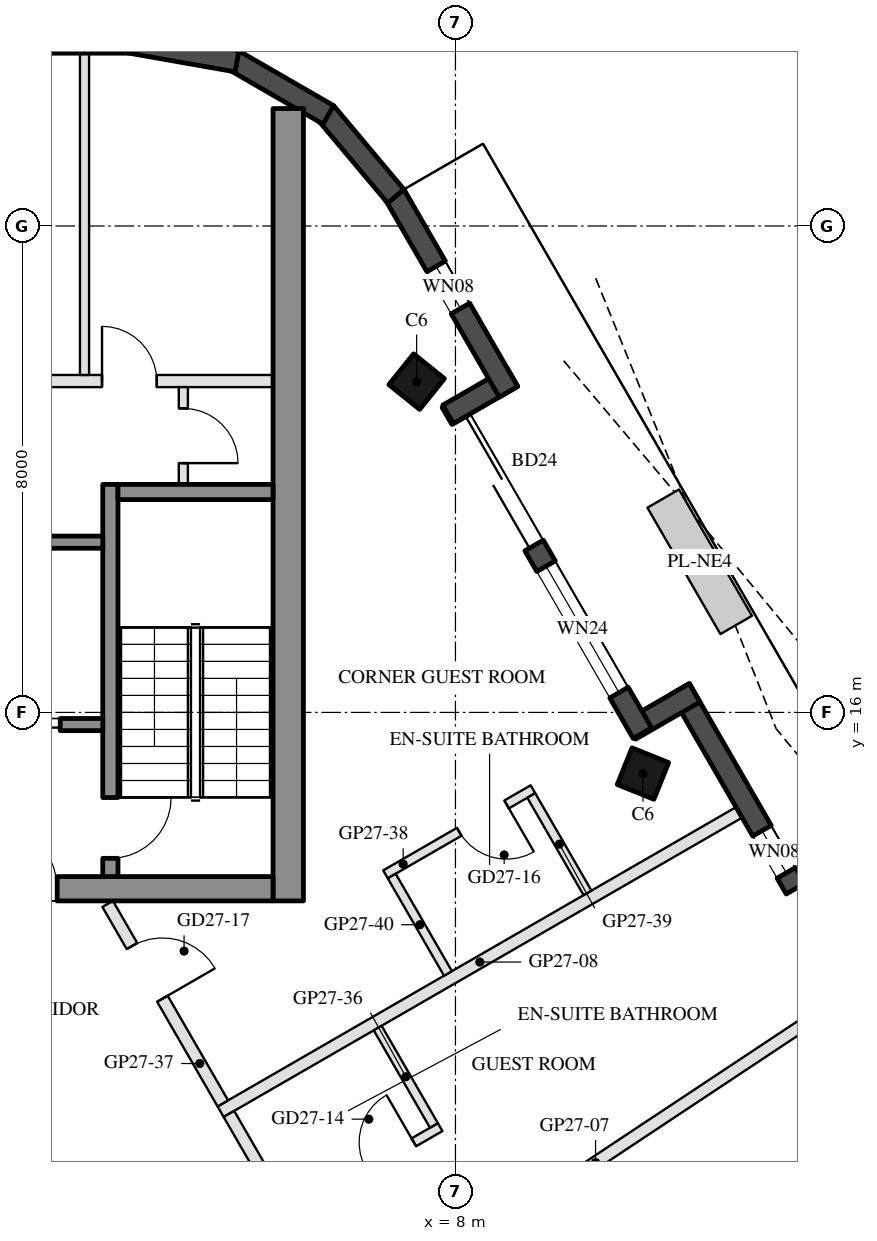
"""IFC4 building model, lengths in metres.
Left out: names, types, materials, properties, quantities, classifications, styles, units other than length and angle.
Written with IfcOpenShell. Run it as: python <this file> out.ifc"""

import sys

from ifc_helpers import new_model, si_unit, direction, frame, frame_2d, origin, origin_2d, place, context, subcontext, project, spatial, rectangle, hollow_rectangle, extrude, boolean, halfspace, element, fill, save


model = new_model("IFC4")
c1 = context("Model", 3, precision=1e-05, world=origin(), true_north=direction((0.0, 1.0)))
c2 = subcontext(c1, "Body", "Model", "MODEL_VIEW")
j1 = project(units=[si_unit("LENGTHUNIT", "METRE"), si_unit("PLANEANGLEUNIT", "RADIAN")], contexts=[c1])
p1 = place(None, origin())
s1 = spatial("IfcSite", under=j1, at=p1, CompositionType="ELEMENT")
p2 = place(p1, origin())
s2 = spatial("IfcBuilding", under=s1, at=p2, CompositionType="ELEMENT")
p3 = place(p2, frame((0.0, 0.0, 276.3)))
s3 = spatial("IfcBuildingStorey", under=s2, at=p3, CompositionType="ELEMENT", Elevation=276.3)
p4 = place(p3, frame((11.083, 14.994, 0.0), z_axis=(-0.100518021011, -0.128316722417, 0.98662604172), x_axis=(-0.503129383785, 0.862065632243, 0.060857775822)))
e1 = element("IfcColumn", 1, at=p4, inside=s3, PredefinedType="COLUMN", context=c2, shape_type="SweptSolid", body=[
    boolean("DIFFERENCE", boolean("DIFFERENCE", extrude(hollow_rectangle(XDim=0.65, YDim=0.65, WallThickness=0.03, at=origin_2d()), origin(), (0.0, 0.0, 1.0), 3.75), halfspace(frame((0.0, 0.0, 0.04), z_axis=(0.0, 0.0, 1.0), x_axis=(1.0, 0.0, 0.0)), True)), halfspace(frame((0.0, 0.0, 3.71), z_axis=(0.0, 0.0, 1.0), x_axis=(1.0, 0.0, 0.0)), False)),
])
p5 = place(p3, frame((7.362, 21.44, 0.0), z_axis=(-0.06966478086, -0.179988931962, 0.981198656073), x_axis=(-0.504437272402, 0.854926536661, 0.121010971086)))
e2 = element("IfcColumn", 2, at=p5, inside=s3, PredefinedType="COLUMN", context=c2, shape_type="SweptSolid", body=[
    boolean("DIFFERENCE", boolean("DIFFERENCE", extrude(hollow_rectangle(XDim=0.65, YDim=0.65, WallThickness=0.03, at=origin_2d()), origin(), (0.0, 0.0, 1.0), 3.771), halfspace(frame((0.0, 0.0, 0.047), z_axis=(0.0, 0.0, 1.0), x_axis=(1.0, 0.0, 0.0)), True)), halfspace(frame((0.0, 0.0, 3.724), z_axis=(0.0, 0.0, 1.0), x_axis=(1.0, 0.0, 0.0)), False)),
])
p6 = place(p3, frame((16.316, 8.381, 0.0), z_axis=(0.0, 0.0, 1.0), x_axis=(-0.500005190411, 0.866022407078, 0.0)))
e3 = element("IfcWall", 3, at=p6, inside=s3, PredefinedType="SOLIDWALL", context=c2, shape_type="SweptSolid", body=[
    extrude(rectangle(XDim=9.244, YDim=0.35, at=frame_2d((4.622, 0.0))), origin(), (0.0, 0.0, 1.0), 3.55),
])
p7 = place(p6, frame((1.614, 0.0, 0.0)))
e4 = element("IfcOpeningElement", 4, at=p7, cuts=e3, PredefinedType="OPENING", context=c2, shape_type="SweptSolid", body=[
    extrude(rectangle(XDim=1.4, YDim=2.4, at=frame_2d((0.7, 1.2))), frame((0.0, 0.185, 0.0), z_axis=(0.0, -1.0, 0.0), x_axis=(1.0, 0.0, 0.0)), (0.0, 0.0, 1.0), 0.37),
])
p8 = place(p6, frame((3.95, 0.0, 0.0)))
e5 = element("IfcOpeningElement", 5, at=p8, cuts=e3, PredefinedType="OPENING", context=c2, shape_type="SweptSolid", body=[
    extrude(rectangle(XDim=1.5, YDim=2.4, at=frame_2d((0.75, 1.2))), frame((0.0, 0.185, 0.0), z_axis=(0.0, -1.0, 0.0), x_axis=(1.0, 0.0, 0.0)), (0.0, 0.0, 1.0), 0.37),
])
p9 = place(p6, frame((5.75, 0.0, 0.3)))
e6 = element("IfcOpeningElement", 6, at=p9, cuts=e3, PredefinedType="OPENING", context=c2, shape_type="SweptSolid", body=[
    extrude(rectangle(XDim=0.8, YDim=2.65, at=frame_2d((0.4, 1.325))), frame((0.0, 0.185, 0.0), z_axis=(0.0, -1.0, 0.0), x_axis=(1.0, 0.0, 0.0)), (0.0, 0.0, 1.0), 0.37),
])
p10 = place(p3, frame((11.934, 16.322, 0.0), z_axis=(0.0, 0.0, 1.0), x_axis=(-0.866005645448, -0.500034220881, 0.0)))
e7 = element("IfcWall", 7, at=p10, inside=s3, PredefinedType="SOLIDWALL", context=c2, shape_type="SweptSolid", body=[
    extrude(rectangle(XDim=1.22, YDim=0.35, at=frame_2d((0.61, 0.0))), origin(), (0.0, 0.0, 1.0), 3.55),
])
p11 = place(p3, frame((11.075, 15.659, 0.0), z_axis=(0.0, 0.0, 1.0), x_axis=(-0.499983676521, 0.866034827944, 0.0)))
e8 = element("IfcWall", 8, at=p11, inside=s3, PredefinedType="SOLIDWALL", context=c2, shape_type="SweptSolid", body=[
    extrude(rectangle(XDim=6.283, YDim=0.35, at=frame_2d((3.142, 0.0))), origin(), (0.0, 0.0, 1.0), 3.55),
])
p12 = place(p11, frame((3.563, 0.0, 0.0)))
e9 = element("IfcOpeningElement", 9, at=p12, cuts=e8, PredefinedType="OPENING", context=c2, shape_type="SweptSolid", body=[
    extrude(rectangle(XDim=2.4, YDim=2.4, at=frame_2d((1.2, 1.2))), frame((0.0, 0.185, 0.0), z_axis=(0.0, -1.0, 0.0), x_axis=(1.0, 0.0, 0.0)), (0.0, 0.0, 1.0), 0.37),
])
p13 = place(p11, frame((0.77, 0.0, 0.3)))
e10 = element("IfcOpeningElement", 10, at=p13, cuts=e8, PredefinedType="OPENING", context=c2, shape_type="SweptSolid", body=[
    extrude(rectangle(XDim=2.4, YDim=2.65, at=frame_2d((1.2, 1.325))), frame((0.0, 0.185, 0.0), z_axis=(0.0, -1.0, 0.0), x_axis=(1.0, 0.0, 0.0)), (0.0, 0.0, 1.0), 0.37),
])
p14 = place(p3, frame((7.88, 20.903, 0.0), z_axis=(0.0, 0.0, 1.0), x_axis=(0.866005645448, 0.500034220881, 0.0)))
e11 = element("IfcWall", 11, at=p14, inside=s3, PredefinedType="SOLIDWALL", context=c2, shape_type="SweptSolid", body=[
    extrude(rectangle(XDim=1.22, YDim=0.35, at=frame_2d((0.61, 0.0))), origin(), (0.0, 0.0, 1.0), 3.55),
])
p15 = place(p3, frame((8.873, 21.274, 0.0), z_axis=(0.0, 0.0, 1.0), x_axis=(-0.50001992892, 0.866013897511, 0.0)))
e12 = element("IfcWall", 12, at=p15, inside=s3, PredefinedType="SOLIDWALL", context=c2, shape_type="SweptSolid", body=[
    extrude(rectangle(XDim=3.741, YDim=0.35, at=frame_2d((1.871, 0.0))), origin(), (0.0, 0.0, 1.0), 3.55),
])
p16 = place(p15, frame((1.581, 0.0, 0.3)))
e13 = element("IfcOpeningElement", 13, at=p16, cuts=e12, PredefinedType="OPENING", context=c2, shape_type="SweptSolid", body=[
    extrude(rectangle(XDim=0.8, YDim=2.65, at=frame_2d((0.4, 1.325))), frame((0.0, 0.185, 0.0), z_axis=(0.0, -1.0, 0.0), x_axis=(1.0, 0.0, 0.0)), (0.0, 0.0, 1.0), 0.37),
])
p17 = place(p3, frame((7.019, 24.489, 0.0), z_axis=(0.0, 0.0, 1.0), x_axis=(-0.642756114672, 0.766070869471, 0.0)))
e14 = element("IfcWall", 14, at=p17, inside=s3, PredefinedType="SOLIDWALL", context=c2, shape_type="SweptSolid", body=[
    extrude(rectangle(XDim=1.8, YDim=0.35, at=frame_2d((0.9, 0.0))), origin(), (0.0, 0.0, 1.0), 3.55),
])
for number, where, z_axis, x_axis in (
    (15, (5.909, 25.829, 0.0), (0.0, 0.0, 1.0), (-0.866, 0.5, 0.0)),
    (16, (4.408, 26.708, 0.0), (0.0, 0.0, 1.0), (-0.985, 0.174, 0.0)),
):
    element("IfcWall", number, at=place(p3, frame(where, z_axis=z_axis, x_axis=x_axis)), inside=s3, PredefinedType="SOLIDWALL", context=c2, shape_type="SweptSolid", body=[
        extrude(rectangle(XDim=1.8, YDim=0.35, at=frame_2d((0.9, 0.0))), origin(), (0.0, 0.0, 1.0), 3.55),
    ])
p18 = place(p3, frame((2.666, 27.018, 0.0), z_axis=(0.0, 0.0, 1.0), x_axis=(-1.0, 0.0, 0.0)))
e17 = element("IfcWall", 17, at=p18, inside=s3, PredefinedType="SOLIDWALL", context=c2, shape_type="SweptSolid", body=[
    extrude(rectangle(XDim=5.331, YDim=0.35, at=frame_2d((2.666, 0.0))), origin(), (0.0, 0.0, 1.0), 3.55),
])
p19 = place(p3, frame((5.25, 12.9, 0.0), z_axis=(0.0, 0.0, 1.0), x_axis=(0.0, 1.0, 0.0)))
e18 = element("IfcWall", 18, at=p19, inside=s3, PredefinedType="SHEAR", context=c2, shape_type="SweptSolid", body=[
    extrude(rectangle(XDim=13.031, YDim=0.5, at=frame_2d((6.516, 0.0))), origin(), (0.0, 0.0, 1.0), 3.5),
])
p20 = place(p3, frame((5.0, 13.1, 0.0), z_axis=(0.0, 0.0, 1.0), x_axis=(-1.0, 0.0, 0.0)))
e19 = element("IfcWall", 19, at=p20, inside=s3, PredefinedType="SHEAR", context=c2, shape_type="SweptSolid", body=[
    extrude(rectangle(XDim=10.0, YDim=0.4, at=frame_2d((5.0, 0.0))), origin(), (0.0, 0.0, 1.0), 3.5),
])
p21 = place(p20, frame((3.55, 0.0, 0.0)))
e20 = element("IfcOpeningElement", 20, at=p21, cuts=e19, PredefinedType="OPENING", context=c2, shape_type="SweptSolid", body=[
    extrude(rectangle(XDim=1.1, YDim=2.1, at=frame_2d((0.55, 1.05))), frame((0.0, 0.21, 0.0), z_axis=(0.0, -1.0, 0.0), x_axis=(1.0, 0.0, 0.0)), (0.0, 0.0, 1.0), 0.42),
])
p22 = place(p20, frame((5.85, 0.0, 0.0)))
e21 = element("IfcOpeningElement", 21, at=p22, cuts=e19, PredefinedType="OPENING", context=c2, shape_type="SweptSolid", body=[
    extrude(rectangle(XDim=1.4, YDim=2.1, at=frame_2d((0.7, 1.05))), frame((0.0, 0.21, 0.0), z_axis=(0.0, -1.0, 0.0), x_axis=(1.0, 0.0, 0.0)), (0.0, 0.0, 1.0), 0.42),
])
p23 = place(p3, frame((2.325, 13.3, 0.0), z_axis=(0.0, 0.0, 1.0), x_axis=(0.0, 1.0, 0.0)))
e22 = element("IfcWall", 22, at=p23, inside=s3, PredefinedType="SHEAR", context=c2, shape_type="SweptSolid", body=[
    extrude(rectangle(XDim=6.45, YDim=0.25, at=frame_2d((3.225, 0.0))), origin(), (0.0, 0.0, 1.0), 3.5),
])
p24 = place(p23, frame((0.3, 0.0, 0.0)))
e23 = element("IfcOpeningElement", 23, at=p24, cuts=e22, PredefinedType="OPENING", context=c2, shape_type="SweptSolid", body=[
    extrude(rectangle(XDim=1.0, YDim=2.1, at=frame_2d((0.5, 1.05))), frame((0.0, 0.135, 0.0), z_axis=(0.0, -1.0, 0.0), x_axis=(1.0, 0.0, 0.0)), (0.0, 0.0, 1.0), 0.27),
])
p25 = place(p3, frame((5.0, 19.625, 0.0), z_axis=(0.0, 0.0, 1.0), x_axis=(-1.0, 0.0, 0.0)))
e24 = element("IfcWall", 24, at=p25, inside=s3, PredefinedType="SHEAR", context=c2, shape_type="SweptSolid", body=[
    extrude(rectangle(XDim=2.55, YDim=0.25, at=frame_2d((1.275, 0.0))), origin(), (0.0, 0.0, 1.0), 3.5),
])
p26 = place(p3, frame((2.2, 18.8, 0.0), z_axis=(0.0, 0.0, 1.0), x_axis=(-1.0, 0.0, 0.0)))
e25 = element("IfcWall", 25, at=p26, inside=s3, PredefinedType="SHEAR", context=c2, shape_type="SweptSolid", body=[
    extrude(rectangle(XDim=2.8, YDim=0.2, at=frame_2d((1.4, 0.0))), origin(), (0.0, 0.0, 1.0), 3.5),
])
p27 = place(p3, frame((2.2, 15.8, 0.0), z_axis=(0.0, 0.0, 1.0), x_axis=(-1.0, 0.0, 0.0)))
e26 = element("IfcWall", 26, at=p27, inside=s3, PredefinedType="SHEAR", context=c2, shape_type="SweptSolid", body=[
    extrude(rectangle(XDim=2.8, YDim=0.2, at=frame_2d((1.4, 0.0))), origin(), (0.0, 0.0, 1.0), 3.5),
])
p28 = place(p27, frame((0.7, 0.0, 0.0)))
e27 = element("IfcOpeningElement", 27, at=p28, cuts=e26, PredefinedType="OPENING", context=c2, shape_type="SweptSolid", body=[
    extrude(rectangle(XDim=1.2, YDim=2.1, at=frame_2d((0.6, 1.05))), frame((0.0, 0.11, 0.0), z_axis=(0.0, -1.0, 0.0), x_axis=(1.0, 0.0, 0.0)), (0.0, 0.0, 1.0), 0.22),
])
p29 = place(p3, frame((5.0, 21.45, 0.0), z_axis=(0.0, 0.0, 1.0), x_axis=(-1.0, 0.0, 0.0)))
e28 = element("IfcWall", 28, at=p29, inside=s3, PredefinedType="PARTITIONING", context=c2, shape_type="SweptSolid", body=[
    extrude(rectangle(XDim=5.4, YDim=0.2, at=frame_2d((2.7, 0.0))), origin(), (0.0, 0.0, 1.0), 3.5),
])
p30 = place(p29, frame((1.913, 0.0, 0.0)))
e29 = element("IfcOpeningElement", 29, at=p30, cuts=e28, PredefinedType="OPENING", context=c2, shape_type="SweptSolid", body=[
    extrude(rectangle(XDim=0.9, YDim=2.1, at=frame_2d((0.45, 1.05))), frame((0.0, 0.11, 0.0), z_axis=(0.0, -1.0, 0.0), x_axis=(1.0, 0.0, 0.0)), (0.0, 0.0, 1.0), 0.22),
])
p31 = place(p29, frame((3.788, 0.0, 0.0)))
e30 = element("IfcOpeningElement", 30, at=p31, cuts=e28, PredefinedType="OPENING", context=c2, shape_type="SweptSolid", body=[
    extrude(rectangle(XDim=0.9, YDim=2.1, at=frame_2d((0.45, 1.05))), frame((0.0, 0.11, 0.0), z_axis=(0.0, -1.0, 0.0), x_axis=(1.0, 0.0, 0.0)), (0.0, 0.0, 1.0), 0.22),
])
p32 = place(p3, frame((3.525, 19.75, 0.0), z_axis=(0.0, 0.0, 1.0), x_axis=(0.0, 1.0, 0.0)))
e31 = element("IfcWall", 31, at=p32, inside=s3, PredefinedType="PARTITIONING", context=c2, shape_type="SweptSolid", body=[
    extrude(rectangle(XDim=1.6, YDim=0.15, at=frame_2d((0.8, 0.0))), origin(), (0.0, 0.0, 1.0), 3.5),
])
p33 = place(p32, frame((0.35, 0.0, 0.0)))
e32 = element("IfcOpeningElement", 32, at=p33, cuts=e31, PredefinedType="OPENING", context=c2, shape_type="SweptSolid", body=[
    extrude(rectangle(XDim=0.9, YDim=2.1, at=frame_2d((0.45, 1.05))), frame((0.0, 0.085, 0.0), z_axis=(0.0, -1.0, 0.0), x_axis=(1.0, 0.0, 0.0)), (0.0, 0.0, 1.0), 0.17),
])
p34 = place(p3, frame((1.9, 21.55, 0.0), z_axis=(0.0, 0.0, 1.0), x_axis=(0.0, 1.0, 0.0)))
e33 = element("IfcWall", 33, at=p34, inside=s3, PredefinedType="PARTITIONING", context=c2, shape_type="SweptSolid", body=[
    extrude(rectangle(XDim=5.292, YDim=0.15, at=frame_2d((2.646, 0.0))), origin(), (0.0, 0.0, 1.0), 3.5),
])
p35 = place(p3, frame((14.415, 11.325, 0.0), z_axis=(0.0, 0.0, 1.0), x_axis=(-0.833315981996, -0.552796955626, 0.0)))
e34 = element("IfcWall", 34, at=p35, inside=s3, PredefinedType="PARTITIONING", context=c2, shape_type="SweptSolid", body=[
    extrude(rectangle(XDim=9.865, YDim=0.2, at=frame_2d((4.933, 0.0))), origin(), (0.0, 0.0, 1.0), 3.1),
])
p36 = place(p3, frame((12.665, 14.356, 0.0), z_axis=(0.0, 0.0, 1.0), x_axis=(-0.86603115344, -0.499990041172, 0.0)))
e35 = element("IfcWall", 35, at=p36, inside=s3, PredefinedType="PARTITIONING", context=c2, shape_type="SweptSolid", body=[
    extrude(rectangle(XDim=9.846, YDim=0.2, at=frame_2d((4.923, 0.0))), origin(), (0.0, 0.0, 1.0), 3.1),
])
p37 = place(p3, frame((4.275, 9.396, 0.0), z_axis=(0.0, 0.0, 1.0), x_axis=(0.499964122822, -0.866046116492, 0.0)))
e36 = element("IfcWall", 36, at=p37, inside=s3, PredefinedType="PARTITIONING", context=c2, shape_type="SweptSolid", body=[
    extrude(rectangle(XDim=3.906, YDim=0.2, at=frame_2d((1.953, 0.0))), origin(), (0.0, 0.0, 1.0), 3.05),
])
p38 = place(p37, frame((2.45, 0.0, 0.0)))
e37 = element("IfcOpeningElement", 37, at=p38, cuts=e36, PredefinedType="OPENING", context=c2, shape_type="SweptSolid", body=[
    extrude(rectangle(XDim=1.0, YDim=2.1, at=frame_2d((0.5, 1.05))), frame((0.0, 0.11, 0.0), z_axis=(0.0, -1.0, 0.0), x_axis=(1.0, 0.0, 0.0)), (0.0, 0.0, 1.0), 0.22),
])
p39 = place(p3, frame((5.324, 7.779, 0.0), z_axis=(0.0, 0.0, 1.0), x_axis=(0.865996816683, 0.500049511043, 0.0)))
e38 = element("IfcWall", 38, at=p39, inside=s3, PredefinedType="PARTITIONING", context=c2, shape_type="SweptSolid", body=[
    extrude(rectangle(XDim=2.8, YDim=0.15, at=frame_2d((1.4, 0.0))), origin(), (0.0, 0.0, 1.0), 3.55),
])
p40 = place(p39, frame((1.4, 0.0, 0.0)))
e39 = element("IfcOpeningElement", 39, at=p40, cuts=e38, PredefinedType="OPENING", context=c2, shape_type="SweptSolid", body=[
    extrude(rectangle(XDim=0.9, YDim=2.1, at=frame_2d((0.45, 1.05))), frame((0.0, 0.085, 0.0), z_axis=(0.0, -1.0, 0.0), x_axis=(1.0, 0.0, 0.0)), (0.0, 0.0, 1.0), 0.17),
])
p41 = place(p3, frame((7.646, 9.207, 0.0), z_axis=(0.0, 0.0, 1.0), x_axis=(-0.49994333299, 0.866058118026, 0.0)))
e40 = element("IfcWall", 40, at=p41, inside=s3, PredefinedType="PARTITIONING", context=c2, shape_type="SweptSolid", body=[
    extrude(rectangle(XDim=1.85, YDim=0.15, at=frame_2d((0.925, 0.0))), origin(), (0.0, 0.0, 1.0), 3.55),
])
p42 = place(p3, frame((2.281, 12.85, 0.0), z_axis=(0.0, 0.0, 1.0), x_axis=(0.499979074716, -0.866037484666, 0.0)))
e41 = element("IfcWall", 41, at=p42, inside=s3, PredefinedType="PARTITIONING", context=c2, shape_type="SweptSolid", body=[
    extrude(rectangle(XDim=3.788, YDim=0.2, at=frame_2d((1.894, 0.0))), origin(), (0.0, 0.0, 1.0), 3.05),
])
p43 = place(p42, frame((0.8, 0.0, 0.0)))
e42 = element("IfcOpeningElement", 42, at=p43, cuts=e41, PredefinedType="OPENING", context=c2, shape_type="SweptSolid", body=[
    extrude(rectangle(XDim=1.0, YDim=2.1, at=frame_2d((0.5, 1.05))), frame((0.0, 0.11, 0.0), z_axis=(0.0, -1.0, 0.0), x_axis=(1.0, 0.0, 0.0)), (0.0, 0.0, 1.0), 0.22),
])
p44 = place(p3, frame((9.274, 14.737, 0.0), z_axis=(0.0, 0.0, 1.0), x_axis=(-0.866018616679, -0.500011755427, 0.0)))
e43 = element("IfcWall", 43, at=p44, inside=s3, PredefinedType="PARTITIONING", context=c2, shape_type="SweptSolid", body=[
    extrude(rectangle(XDim=2.8, YDim=0.15, at=frame_2d((1.4, 0.0))), origin(), (0.0, 0.0, 1.0), 3.55),
])
p45 = place(p44, frame((0.5, 0.0, 0.0)))
e44 = element("IfcOpeningElement", 44, at=p45, cuts=e43, PredefinedType="OPENING", context=c2, shape_type="SweptSolid", body=[
    extrude(rectangle(XDim=0.9, YDim=2.1, at=frame_2d((0.45, 1.05))), frame((0.0, 0.085, 0.0), z_axis=(0.0, -1.0, 0.0), x_axis=(1.0, 0.0, 0.0)), (0.0, 0.0, 1.0), 0.17),
])
p46 = place(p3, frame((10.172, 13.032, 0.0), z_axis=(0.0, 0.0, 1.0), x_axis=(-0.500042316284, 0.866000971088, 0.0)))
e45 = element("IfcWall", 45, at=p46, inside=s3, PredefinedType="PARTITIONING", context=c2, shape_type="SweptSolid", body=[
    extrude(rectangle(XDim=1.85, YDim=0.15, at=frame_2d((0.925, 0.0))), origin(), (0.0, 0.0, 1.0), 3.05),
])
p47 = place(p3, frame((7.877, 11.707, 0.0), z_axis=(0.0, 0.0, 1.0), x_axis=(-0.499985172903, 0.866033964044, 0.0)))
e46 = element("IfcWall", 46, at=p47, inside=s3, PredefinedType="PARTITIONING", context=c2, shape_type="SweptSolid", body=[
    extrude(rectangle(XDim=1.85, YDim=0.15, at=frame_2d((0.925, 0.0))), origin(), (0.0, 0.0, 1.0), 3.05),
])
p48 = place(p8, frame((1.5, 0.0, 0.0), z_axis=(0.0, 0.0, 1.0), x_axis=(-1.0, 0.0, 0.0)))
e47 = element("IfcDoor", 47, at=p48, inside=s3, OperationType="SLIDING_TO_LEFT", PredefinedType="DOOR", context=c2, shape_type="SweptSolid", body=[
    extrude(rectangle(XDim=1.5, YDim=2.4, at=frame_2d((0.75, 1.2))), frame((0.0, 0.025, 0.0), z_axis=(0.0, -1.0, 0.0), x_axis=(1.0, 0.0, 0.0)), (0.0, 0.0, 1.0), 0.05),
])
fill(e5, e47)
p49 = place(p9, origin())
e48 = element("IfcWindow", 48, at=p49, inside=s3, PartitioningType="SINGLE_PANEL", PredefinedType="WINDOW", context=c2, shape_type="SweptSolid", body=[
    extrude(rectangle(XDim=0.8, YDim=2.65, at=frame_2d((0.4, 1.325))), frame((0.0, 0.03, 0.0), z_axis=(0.0, -1.0, 0.0), x_axis=(1.0, 0.0, 0.0)), (0.0, 0.0, 1.0), 0.06),
])
fill(e6, e48)
p50 = place(p12, frame((2.4, 0.0, 0.0), z_axis=(0.0, 0.0, 1.0), x_axis=(-1.0, 0.0, 0.0)))
e49 = element("IfcDoor", 49, at=p50, inside=s3, OperationType="SLIDING_TO_LEFT", PredefinedType="DOOR", context=c2, shape_type="SweptSolid", body=[
    extrude(rectangle(XDim=2.4, YDim=2.4, at=frame_2d((1.2, 1.2))), frame((0.0, 0.025, 0.0), z_axis=(0.0, -1.0, 0.0), x_axis=(1.0, 0.0, 0.0)), (0.0, 0.0, 1.0), 0.05),
])
fill(e9, e49)
p51 = place(p13, origin())
e50 = element("IfcWindow", 50, at=p51, inside=s3, PartitioningType="SINGLE_PANEL", PredefinedType="WINDOW", context=c2, shape_type="SweptSolid", body=[
    extrude(rectangle(XDim=2.4, YDim=2.65, at=frame_2d((1.2, 1.325))), frame((0.0, 0.03, 0.0), z_axis=(0.0, -1.0, 0.0), x_axis=(1.0, 0.0, 0.0)), (0.0, 0.0, 1.0), 0.06),
])
fill(e10, e50)
p52 = place(p16, origin())
e51 = element("IfcWindow", 51, at=p52, inside=s3, PartitioningType="SINGLE_PANEL", PredefinedType="WINDOW", context=c2, shape_type="SweptSolid", body=[
    extrude(rectangle(XDim=0.8, YDim=2.65, at=frame_2d((0.4, 1.325))), frame((0.0, 0.03, 0.0), z_axis=(0.0, -1.0, 0.0), x_axis=(1.0, 0.0, 0.0)), (0.0, 0.0, 1.0), 0.06),
])
fill(e13, e51)
p53 = place(p28, origin())
e52 = element("IfcDoor", 52, at=p53, inside=s3, OperationType="DOUBLE_DOOR_SLIDING", PredefinedType="DOOR", context=c2, shape_type="SweptSolid", body=[
    extrude(rectangle(XDim=1.2, YDim=2.1, at=frame_2d((0.6, 1.05))), frame((0.0, 0.025, 0.0), z_axis=(0.0, -1.0, 0.0), x_axis=(1.0, 0.0, 0.0)), (0.0, 0.0, 1.0), 0.05),
])
fill(e27, e52)
p54 = place(p33, frame((0.9, 0.0, 0.0), z_axis=(0.0, 0.0, 1.0), x_axis=(-1.0, 0.0, 0.0)))
e53 = element("IfcDoor", 53, at=p54, inside=s3, OperationType="SINGLE_SWING_RIGHT", PredefinedType="DOOR", context=c2, shape_type="SweptSolid", body=[
    extrude(rectangle(XDim=0.9, YDim=2.1, at=frame_2d((0.45, 1.05))), frame((0.0, 0.025, 0.0), z_axis=(0.0, -1.0, 0.0), x_axis=(1.0, 0.0, 0.0)), (0.0, 0.0, 1.0), 0.05),
])
fill(e32, e53)
p55 = place(p30, frame((0.9, 0.0, 0.0), z_axis=(0.0, 0.0, 1.0), x_axis=(-1.0, 0.0, 0.0)))
e54 = element("IfcDoor", 54, at=p55, inside=s3, OperationType="SINGLE_SWING_LEFT", PredefinedType="DOOR", context=c2, shape_type="SweptSolid", body=[
    extrude(rectangle(XDim=0.9, YDim=2.1, at=frame_2d((0.45, 1.05))), frame((0.0, 0.025, 0.0), z_axis=(0.0, -1.0, 0.0), x_axis=(1.0, 0.0, 0.0)), (0.0, 0.0, 1.0), 0.05),
])
fill(e29, e54)
p56 = place(p21, frame((1.1, 0.0, 0.0), z_axis=(0.0, 0.0, 1.0), x_axis=(-1.0, 0.0, 0.0)))
e55 = element("IfcDoor", 55, at=p56, inside=s3, OperationType="SINGLE_SWING_LEFT", PredefinedType="DOOR", context=c2, shape_type="SweptSolid", body=[
    extrude(rectangle(XDim=1.1, YDim=2.1, at=frame_2d((0.55, 1.05))), frame((0.0, 0.025, 0.0), z_axis=(0.0, -1.0, 0.0), x_axis=(1.0, 0.0, 0.0)), (0.0, 0.0, 1.0), 0.05),
])
fill(e20, e55)
p57 = place(p24, frame((1.0, 0.0, 0.0), z_axis=(0.0, 0.0, 1.0), x_axis=(-1.0, 0.0, 0.0)))
e56 = element("IfcDoor", 56, at=p57, inside=s3, OperationType="SINGLE_SWING_LEFT", PredefinedType="DOOR", context=c2, shape_type="SweptSolid", body=[
    extrude(rectangle(XDim=1.0, YDim=2.1, at=frame_2d((0.5, 1.05))), frame((0.0, 0.025, 0.0), z_axis=(0.0, -1.0, 0.0), x_axis=(1.0, 0.0, 0.0)), (0.0, 0.0, 1.0), 0.05),
])
fill(e23, e56)
p58 = place(p40, origin())
e57 = element("IfcDoor", 57, at=p58, inside=s3, OperationType="SINGLE_SWING_RIGHT", PredefinedType="DOOR", context=c2, shape_type="SweptSolid", body=[
    extrude(rectangle(XDim=0.9, YDim=2.1, at=frame_2d((0.45, 1.05))), frame((0.0, 0.025, 0.0), z_axis=(0.0, -1.0, 0.0), x_axis=(1.0, 0.0, 0.0)), (0.0, 0.0, 1.0), 0.05),
])
fill(e39, e57)
p59 = place(p45, origin())
e58 = element("IfcDoor", 58, at=p59, inside=s3, OperationType="SINGLE_SWING_LEFT", PredefinedType="DOOR", context=c2, shape_type="SweptSolid", body=[
    extrude(rectangle(XDim=0.9, YDim=2.1, at=frame_2d((0.45, 1.05))), frame((0.0, 0.025, 0.0), z_axis=(0.0, -1.0, 0.0), x_axis=(1.0, 0.0, 0.0)), (0.0, 0.0, 1.0), 0.05),
])
fill(e44, e58)
p60 = place(p43, origin())
e59 = element("IfcDoor", 59, at=p60, inside=s3, OperationType="SINGLE_SWING_RIGHT", PredefinedType="DOOR", context=c2, shape_type="SweptSolid", body=[
    extrude(rectangle(XDim=1.0, YDim=2.1, at=frame_2d((0.5, 1.05))), frame((0.0, 0.025, 0.0), z_axis=(0.0, -1.0, 0.0), x_axis=(1.0, 0.0, 0.0)), (0.0, 0.0, 1.0), 0.05),
])
fill(e42, e59)
save(model, sys.argv[1])
